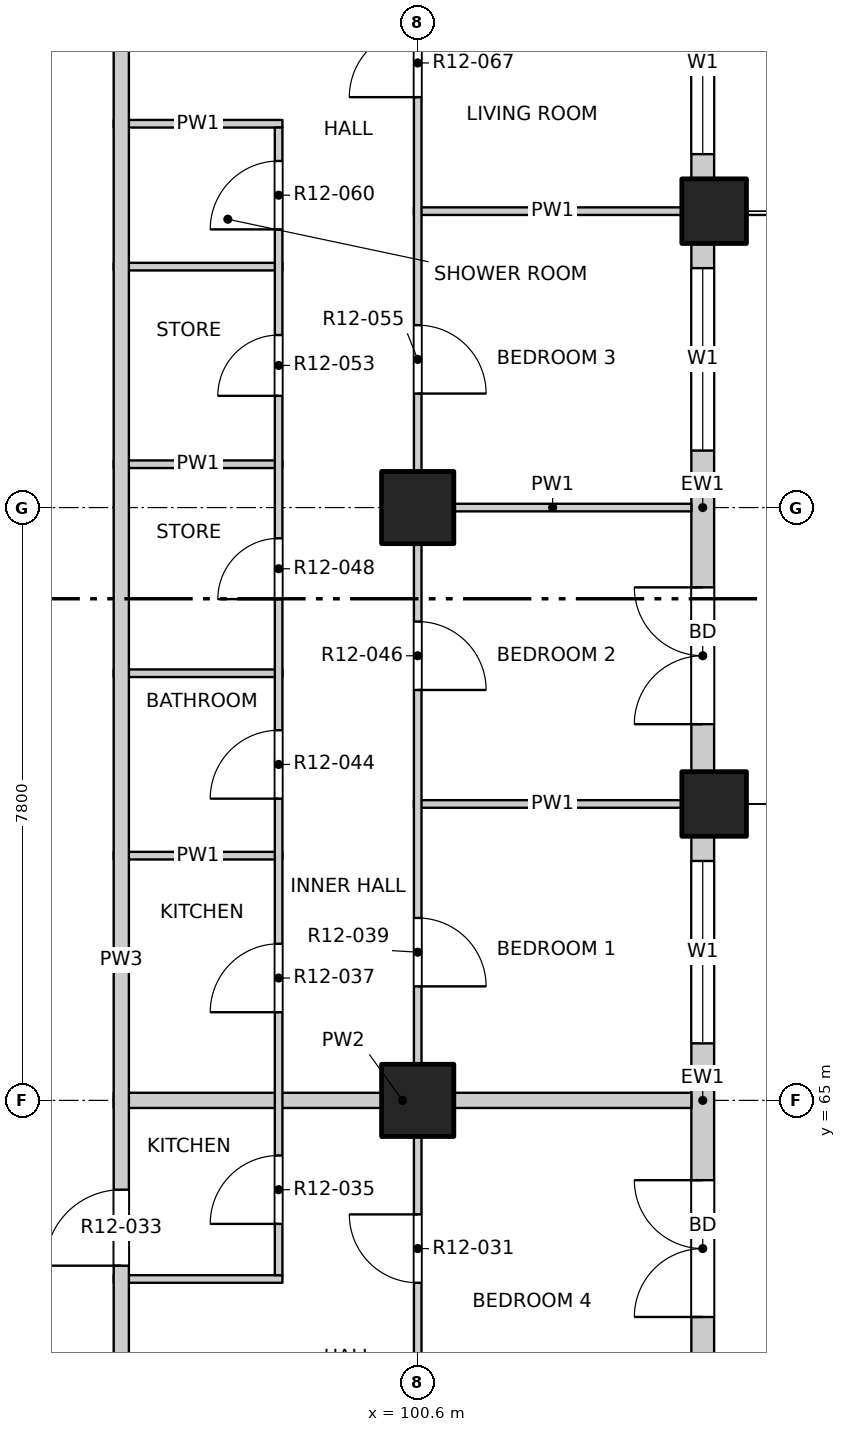
"""IFC4 building model, lengths in metres.
Left out: names, types, materials, properties, quantities, classifications, styles, units other than length and angle.
Written with IfcOpenShell. Run it as: python <this file> out.ifc"""

import sys

from ifc_helpers import new_model, si_unit, direction, frame, frame_2d, origin, origin_2d, place, context, subcontext, project, spatial, rectangle, extrude, element, fill, save


model = new_model("IFC4")
c1 = context("Model", 3, precision=1e-05, world=origin(), true_north=direction((0.0, 1.0)))
c2 = subcontext(c1, "Body", "Model", "MODEL_VIEW")
j1 = project(units=[si_unit("LENGTHUNIT", "METRE"), si_unit("PLANEANGLEUNIT", "RADIAN")], contexts=[c1])
p1 = place(None, origin())
s1 = spatial("IfcSite", under=j1, at=p1, CompositionType="ELEMENT")
p2 = place(p1, origin())
s2 = spatial("IfcBuilding", under=s1, at=p2, CompositionType="ELEMENT")
p3 = place(p2, frame((0.0, 0.0, 137.3)))
s3 = spatial("IfcBuildingStorey", under=s2, at=p3, CompositionType="ELEMENT", Elevation=137.3)
for number, where, z_axis, x_axis in (
    (1, (104.5, 68.9, -0.25), (0.0, 0.0, 1.0), (1.0, 0.0, 0.0)),
    (2, (104.5, 76.7, -0.25), (0.0, 0.0, 1.0), (1.0, 0.0, 0.0)),
):
    element("IfcColumn", number, at=place(p3, frame(where, z_axis=z_axis, x_axis=x_axis)), inside=s3, PredefinedType="COLUMN", context=c2, shape_type="SweptSolid", body=[
        extrude(rectangle(XDim=0.85, YDim=0.85, at=origin_2d()), origin(), (0.0, 0.0, 1.0), 3.4),
    ])
for number, where, z_axis, x_axis in (
    (3, (100.6, 65.0, -0.25), (0.0, 0.0, 1.0), (1.0, 0.0, 0.0)),
    (4, (100.6, 72.8, -0.25), (0.0, 0.0, 1.0), (1.0, 0.0, 0.0)),
):
    element("IfcColumn", number, at=place(p3, frame(where, z_axis=z_axis, x_axis=x_axis)), inside=s3, PredefinedType="COLUMN", context=c2, shape_type="SweptSolid", body=[
        extrude(rectangle(XDim=0.95, YDim=0.95, at=origin_2d()), origin(), (0.0, 0.0, 1.0), 3.4),
    ])
p4 = place(p3, frame((104.35, 61.525, 0.0), z_axis=(0.0, 0.0, 1.0), x_axis=(0.0, 1.0, 0.0)))
e5 = element("IfcWall", 5, at=p4, inside=s3, PredefinedType="SOLIDWALL", context=c2, shape_type="SweptSolid", body=[
    extrude(rectangle(XDim=6.95, YDim=0.3, at=frame_2d((3.475, 0.0))), origin(), (0.0, 0.0, 1.0), 2.7),
])
p5 = place(p4, frame((0.625, 0.0, 0.0)))
e6 = element("IfcOpeningElement", 6, at=p5, cuts=e5, PredefinedType="OPENING", context=c2, shape_type="SweptSolid", body=[
    extrude(rectangle(XDim=1.8, YDim=2.4, at=frame_2d((0.9, 1.2))), frame((0.0, 0.16, 0.0), z_axis=(0.0, -1.0, 0.0), x_axis=(1.0, 0.0, 0.0)), (0.0, 0.0, 1.0), 0.32),
])
p6 = place(p4, frame((4.225, 0.0, 0.9)))
e7 = element("IfcOpeningElement", 7, at=p6, cuts=e5, PredefinedType="OPENING", context=c2, shape_type="SweptSolid", body=[
    extrude(rectangle(XDim=2.4, YDim=1.8, at=frame_2d((1.2, 0.9))), frame((0.0, 0.16, 0.0), z_axis=(0.0, -1.0, 0.0), x_axis=(1.0, 0.0, 0.0)), (0.0, 0.0, 1.0), 0.32),
])
p7 = place(p3, frame((104.35, 69.325, 0.0), z_axis=(0.0, 0.0, 1.0), x_axis=(0.0, 1.0, 0.0)))
e8 = element("IfcWall", 8, at=p7, inside=s3, PredefinedType="SOLIDWALL", context=c2, shape_type="SweptSolid", body=[
    extrude(rectangle(XDim=6.95, YDim=0.3, at=frame_2d((3.475, 0.0))), origin(), (0.0, 0.0, 1.0), 2.7),
])
p8 = place(p7, frame((0.625, 0.0, 0.0)))
e9 = element("IfcOpeningElement", 9, at=p8, cuts=e8, PredefinedType="OPENING", context=c2, shape_type="SweptSolid", body=[
    extrude(rectangle(XDim=1.8, YDim=2.4, at=frame_2d((0.9, 1.2))), frame((0.0, 0.16, 0.0), z_axis=(0.0, -1.0, 0.0), x_axis=(1.0, 0.0, 0.0)), (0.0, 0.0, 1.0), 0.32),
])
p9 = place(p7, frame((4.225, 0.0, 0.9)))
e10 = element("IfcOpeningElement", 10, at=p9, cuts=e8, PredefinedType="OPENING", context=c2, shape_type="SweptSolid", body=[
    extrude(rectangle(XDim=2.4, YDim=1.8, at=frame_2d((1.2, 0.9))), frame((0.0, 0.16, 0.0), z_axis=(0.0, -1.0, 0.0), x_axis=(1.0, 0.0, 0.0)), (0.0, 0.0, 1.0), 0.32),
])
p10 = place(p3, frame((104.35, 77.125, 0.0), z_axis=(0.0, 0.0, 1.0), x_axis=(0.0, 1.0, 0.0)))
e11 = element("IfcWall", 11, at=p10, inside=s3, PredefinedType="SOLIDWALL", context=c2, shape_type="SweptSolid", body=[
    extrude(rectangle(XDim=3.475, YDim=0.3, at=frame_2d((1.738, 0.0))), origin(), (0.0, 0.0, 1.0), 2.7),
])
p11 = place(p10, frame((0.325, 0.0, 0.9)))
e12 = element("IfcOpeningElement", 12, at=p11, cuts=e11, PredefinedType="OPENING", context=c2, shape_type="SweptSolid", body=[
    extrude(rectangle(XDim=2.4, YDim=1.8, at=frame_2d((1.2, 0.9))), frame((0.0, 0.16, 0.0), z_axis=(0.0, -1.0, 0.0), x_axis=(1.0, 0.0, 0.0)), (0.0, 0.0, 1.0), 0.32),
])
p12 = place(p3, frame((96.6, 62.65, 0.0), z_axis=(0.0, 0.0, 1.0), x_axis=(1.0, 0.0, 0.0)))
e13 = element("IfcWall", 13, at=p12, inside=s3, PredefinedType="PARTITIONING", context=c2, shape_type="SweptSolid", body=[
    extrude(rectangle(XDim=2.22, YDim=0.1, at=frame_2d((1.11, 0.0))), origin(), (0.0, 0.0, 1.0), 3.15),
])
p13 = place(p3, frame((96.6, 65.0, 0.0), z_axis=(0.0, 0.0, 1.0), x_axis=(1.0, 0.0, 0.0)))
e14 = element("IfcWall", 14, at=p13, inside=s3, PredefinedType="PARTITIONING", context=c2, shape_type="SweptSolid", body=[
    extrude(rectangle(XDim=7.6, YDim=0.2, at=frame_2d((3.8, 0.0))), origin(), (0.0, 0.0, 1.0), 3.15),
])
p14 = place(p3, frame((96.6, 68.22, 0.0), z_axis=(0.0, 0.0, 1.0), x_axis=(1.0, 0.0, 0.0)))
e15 = element("IfcWall", 15, at=p14, inside=s3, PredefinedType="PARTITIONING", context=c2, shape_type="SweptSolid", body=[
    extrude(rectangle(XDim=2.22, YDim=0.1, at=frame_2d((1.11, 0.0))), origin(), (0.0, 0.0, 1.0), 3.15),
])
p15 = place(p3, frame((100.55, 68.9, 0.0), z_axis=(0.0, 0.0, 1.0), x_axis=(1.0, 0.0, 0.0)))
e16 = element("IfcWall", 16, at=p15, inside=s3, PredefinedType="PARTITIONING", context=c2, shape_type="SweptSolid", body=[
    extrude(rectangle(XDim=3.65, YDim=0.1, at=frame_2d((1.825, 0.0))), origin(), (0.0, 0.0, 1.0), 2.55),
])
p16 = place(p3, frame((96.6, 70.62, 0.0), z_axis=(0.0, 0.0, 1.0), x_axis=(1.0, 0.0, 0.0)))
e17 = element("IfcWall", 17, at=p16, inside=s3, PredefinedType="PARTITIONING", context=c2, shape_type="SweptSolid", body=[
    extrude(rectangle(XDim=2.22, YDim=0.1, at=frame_2d((1.11, 0.0))), origin(), (0.0, 0.0, 1.0), 3.15),
])
p17 = place(p3, frame((100.55, 72.8, 0.0), z_axis=(0.0, 0.0, 1.0), x_axis=(1.0, 0.0, 0.0)))
e18 = element("IfcWall", 18, at=p17, inside=s3, PredefinedType="PARTITIONING", context=c2, shape_type="SweptSolid", body=[
    extrude(rectangle(XDim=3.65, YDim=0.1, at=frame_2d((1.825, 0.0))), origin(), (0.0, 0.0, 1.0), 3.15),
])
for number, where, z_axis, x_axis in (
    (19, (96.6, 73.37, 0.0), (0.0, 0.0, 1.0), (1.0, 0.0, 0.0)),
    (20, (96.6, 75.97, 0.0), (0.0, 0.0, 1.0), (1.0, 0.0, 0.0)),
):
    element("IfcWall", number, at=place(p3, frame(where, z_axis=z_axis, x_axis=x_axis)), inside=s3, PredefinedType="PARTITIONING", context=c2, shape_type="SweptSolid", body=[
        extrude(rectangle(XDim=2.22, YDim=0.1, at=frame_2d((1.11, 0.0))), origin(), (0.0, 0.0, 1.0), 3.15),
    ])
p18 = place(p3, frame((100.55, 76.7, 0.0), z_axis=(0.0, 0.0, 1.0), x_axis=(1.0, 0.0, 0.0)))
e21 = element("IfcWall", 21, at=p18, inside=s3, PredefinedType="PARTITIONING", context=c2, shape_type="SweptSolid", body=[
    extrude(rectangle(XDim=3.65, YDim=0.1, at=frame_2d((1.825, 0.0))), origin(), (0.0, 0.0, 1.0), 2.55),
])
p19 = place(p3, frame((96.6, 77.85, 0.0), z_axis=(0.0, 0.0, 1.0), x_axis=(1.0, 0.0, 0.0)))
e22 = element("IfcWall", 22, at=p19, inside=s3, PredefinedType="PARTITIONING", context=c2, shape_type="SweptSolid", body=[
    extrude(rectangle(XDim=2.22, YDim=0.1, at=frame_2d((1.11, 0.0))), origin(), (0.0, 0.0, 1.0), 3.15),
])
p20 = place(p3, frame((96.7, 49.5, 0.0), z_axis=(0.0, 0.0, 1.0), x_axis=(0.0, 1.0, 0.0)))
e23 = element("IfcWall", 23, at=p20, inside=s3, PredefinedType="PARTITIONING", context=c2, shape_type="SweptSolid", body=[
    extrude(rectangle(XDim=34.7, YDim=0.2, at=frame_2d((17.35, 0.0))), origin(), (0.0, 0.0, 1.0), 3.15),
])
p21 = place(p20, frame((13.325, 0.0, 0.0)))
e24 = element("IfcOpeningElement", 24, at=p21, cuts=e23, PredefinedType="OPENING", context=c2, shape_type="SweptSolid", body=[
    extrude(rectangle(XDim=1.0, YDim=2.1, at=frame_2d((0.5, 1.05))), frame((0.0, 0.11, 0.0), z_axis=(0.0, -1.0, 0.0), x_axis=(1.0, 0.0, 0.0)), (0.0, 0.0, 1.0), 0.22),
])
p22 = place(p20, frame((29.625, 0.0, 0.0)))
e25 = element("IfcOpeningElement", 25, at=p22, cuts=e23, PredefinedType="OPENING", context=c2, shape_type="SweptSolid", body=[
    extrude(rectangle(XDim=1.0, YDim=2.1, at=frame_2d((0.5, 1.05))), frame((0.0, 0.11, 0.0), z_axis=(0.0, -1.0, 0.0), x_axis=(1.0, 0.0, 0.0)), (0.0, 0.0, 1.0), 0.22),
])
p23 = place(p3, frame((98.77, 62.7, 0.0), z_axis=(0.0, 0.0, 1.0), x_axis=(0.0, 1.0, 0.0)))
e26 = element("IfcWall", 26, at=p23, inside=s3, PredefinedType="PARTITIONING", context=c2, shape_type="SweptSolid", body=[
    extrude(rectangle(XDim=15.1, YDim=0.1, at=frame_2d((7.55, 0.0))), origin(), (0.0, 0.0, 1.0), 3.15),
])
p24 = place(p23, frame((0.675, 0.0, 0.0)))
e27 = element("IfcOpeningElement", 27, at=p24, cuts=e26, PredefinedType="OPENING", context=c2, shape_type="SweptSolid", body=[
    extrude(rectangle(XDim=0.9, YDim=2.1, at=frame_2d((0.45, 1.05))), frame((0.0, 0.06, 0.0), z_axis=(0.0, -1.0, 0.0), x_axis=(1.0, 0.0, 0.0)), (0.0, 0.0, 1.0), 0.12),
])
p25 = place(p23, frame((3.46, 0.0, 0.0)))
e28 = element("IfcOpeningElement", 28, at=p25, cuts=e26, PredefinedType="OPENING", context=c2, shape_type="SweptSolid", body=[
    extrude(rectangle(XDim=0.9, YDim=2.1, at=frame_2d((0.45, 1.05))), frame((0.0, 0.06, 0.0), z_axis=(0.0, -1.0, 0.0), x_axis=(1.0, 0.0, 0.0)), (0.0, 0.0, 1.0), 0.12),
])
p26 = place(p23, frame((6.27, 0.0, 0.0)))
e29 = element("IfcOpeningElement", 29, at=p26, cuts=e26, PredefinedType="OPENING", context=c2, shape_type="SweptSolid", body=[
    extrude(rectangle(XDim=0.9, YDim=2.1, at=frame_2d((0.45, 1.05))), frame((0.0, 0.06, 0.0), z_axis=(0.0, -1.0, 0.0), x_axis=(1.0, 0.0, 0.0)), (0.0, 0.0, 1.0), 0.12),
])
p27 = place(p23, frame((8.895, 0.0, 0.0)))
e30 = element("IfcOpeningElement", 30, at=p27, cuts=e26, PredefinedType="OPENING", context=c2, shape_type="SweptSolid", body=[
    extrude(rectangle(XDim=0.8, YDim=2.1, at=frame_2d((0.4, 1.05))), frame((0.0, 0.06, 0.0), z_axis=(0.0, -1.0, 0.0), x_axis=(1.0, 0.0, 0.0)), (0.0, 0.0, 1.0), 0.12),
])
p28 = place(p23, frame((11.57, 0.0, 0.0)))
e31 = element("IfcOpeningElement", 31, at=p28, cuts=e26, PredefinedType="OPENING", context=c2, shape_type="SweptSolid", body=[
    extrude(rectangle(XDim=0.8, YDim=2.1, at=frame_2d((0.4, 1.05))), frame((0.0, 0.06, 0.0), z_axis=(0.0, -1.0, 0.0), x_axis=(1.0, 0.0, 0.0)), (0.0, 0.0, 1.0), 0.12),
])
p29 = place(p23, frame((13.76, 0.0, 0.0)))
e32 = element("IfcOpeningElement", 32, at=p29, cuts=e26, PredefinedType="OPENING", context=c2, shape_type="SweptSolid", body=[
    extrude(rectangle(XDim=0.9, YDim=2.1, at=frame_2d((0.45, 1.05))), frame((0.0, 0.06, 0.0), z_axis=(0.0, -1.0, 0.0), x_axis=(1.0, 0.0, 0.0)), (0.0, 0.0, 1.0), 0.12),
])
p30 = place(p3, frame((100.6, 45.8, 0.0), z_axis=(0.0, 0.0, 1.0), x_axis=(0.0, 1.0, 0.0)))
e33 = element("IfcWall", 33, at=p30, inside=s3, PredefinedType="PARTITIONING", context=c2, shape_type="SweptSolid", body=[
    extrude(rectangle(XDim=38.4, YDim=0.1, at=frame_2d((19.2, 0.0))), origin(), (0.0, 0.0, 1.0), 3.15),
])
p31 = place(p30, frame((1.05, 0.0, 0.0)))
e34 = element("IfcOpeningElement", 34, at=p31, cuts=e33, PredefinedType="OPENING", context=c2, shape_type="SweptSolid", body=[
    extrude(rectangle(XDim=1.2, YDim=2.1, at=frame_2d((0.6, 1.05))), frame((0.0, 0.06, 0.0), z_axis=(0.0, -1.0, 0.0), x_axis=(1.0, 0.0, 0.0)), (0.0, 0.0, 1.0), 0.12),
])
p32 = place(p30, frame((5.1, 0.0, 0.0)))
e35 = element("IfcOpeningElement", 35, at=p32, cuts=e33, PredefinedType="OPENING", context=c2, shape_type="SweptSolid", body=[
    extrude(rectangle(XDim=0.9, YDim=2.1, at=frame_2d((0.45, 1.05))), frame((0.0, 0.06, 0.0), z_axis=(0.0, -1.0, 0.0), x_axis=(1.0, 0.0, 0.0)), (0.0, 0.0, 1.0), 0.12),
])
p33 = place(p30, frame((9.0, 0.0, 0.0)))
e36 = element("IfcOpeningElement", 36, at=p33, cuts=e33, PredefinedType="OPENING", context=c2, shape_type="SweptSolid", body=[
    extrude(rectangle(XDim=0.9, YDim=2.1, at=frame_2d((0.45, 1.05))), frame((0.0, 0.06, 0.0), z_axis=(0.0, -1.0, 0.0), x_axis=(1.0, 0.0, 0.0)), (0.0, 0.0, 1.0), 0.12),
])
p34 = place(p30, frame((12.9, 0.0, 0.0)))
e37 = element("IfcOpeningElement", 37, at=p34, cuts=e33, PredefinedType="OPENING", context=c2, shape_type="SweptSolid", body=[
    extrude(rectangle(XDim=0.9, YDim=2.1, at=frame_2d((0.45, 1.05))), frame((0.0, 0.06, 0.0), z_axis=(0.0, -1.0, 0.0), x_axis=(1.0, 0.0, 0.0)), (0.0, 0.0, 1.0), 0.12),
])
p35 = place(p30, frame((16.8, 0.0, 0.0)))
e38 = element("IfcOpeningElement", 38, at=p35, cuts=e33, PredefinedType="OPENING", context=c2, shape_type="SweptSolid", body=[
    extrude(rectangle(XDim=0.9, YDim=2.1, at=frame_2d((0.45, 1.05))), frame((0.0, 0.06, 0.0), z_axis=(0.0, -1.0, 0.0), x_axis=(1.0, 0.0, 0.0)), (0.0, 0.0, 1.0), 0.12),
])
p36 = place(p30, frame((20.7, 0.0, 0.0)))
e39 = element("IfcOpeningElement", 39, at=p36, cuts=e33, PredefinedType="OPENING", context=c2, shape_type="SweptSolid", body=[
    extrude(rectangle(XDim=0.9, YDim=2.1, at=frame_2d((0.45, 1.05))), frame((0.0, 0.06, 0.0), z_axis=(0.0, -1.0, 0.0), x_axis=(1.0, 0.0, 0.0)), (0.0, 0.0, 1.0), 0.12),
])
p37 = place(p30, frame((24.6, 0.0, 0.0)))
e40 = element("IfcOpeningElement", 40, at=p37, cuts=e33, PredefinedType="OPENING", context=c2, shape_type="SweptSolid", body=[
    extrude(rectangle(XDim=0.9, YDim=2.1, at=frame_2d((0.45, 1.05))), frame((0.0, 0.06, 0.0), z_axis=(0.0, -1.0, 0.0), x_axis=(1.0, 0.0, 0.0)), (0.0, 0.0, 1.0), 0.12),
])
p38 = place(p30, frame((28.5, 0.0, 0.0)))
e41 = element("IfcOpeningElement", 41, at=p38, cuts=e33, PredefinedType="OPENING", context=c2, shape_type="SweptSolid", body=[
    extrude(rectangle(XDim=0.9, YDim=2.1, at=frame_2d((0.45, 1.05))), frame((0.0, 0.06, 0.0), z_axis=(0.0, -1.0, 0.0), x_axis=(1.0, 0.0, 0.0)), (0.0, 0.0, 1.0), 0.12),
])
p39 = place(p30, frame((32.4, 0.0, 0.0)))
e42 = element("IfcOpeningElement", 42, at=p39, cuts=e33, PredefinedType="OPENING", context=c2, shape_type="SweptSolid", body=[
    extrude(rectangle(XDim=0.9, YDim=2.1, at=frame_2d((0.45, 1.05))), frame((0.0, 0.06, 0.0), z_axis=(0.0, -1.0, 0.0), x_axis=(1.0, 0.0, 0.0)), (0.0, 0.0, 1.0), 0.12),
])
p40 = place(p30, frame((36.15, 0.0, 0.0)))
e43 = element("IfcOpeningElement", 43, at=p40, cuts=e33, PredefinedType="OPENING", context=c2, shape_type="SweptSolid", body=[
    extrude(rectangle(XDim=1.2, YDim=2.1, at=frame_2d((0.6, 1.05))), frame((0.0, 0.06, 0.0), z_axis=(0.0, -1.0, 0.0), x_axis=(1.0, 0.0, 0.0)), (0.0, 0.0, 1.0), 0.12),
])
p41 = place(p5, origin())
e44 = element("IfcDoor", 44, at=p41, inside=s3, OperationType="DOUBLE_DOOR_SINGLE_SWING", PredefinedType="DOOR", context=c2, shape_type="SweptSolid", body=[
    extrude(rectangle(XDim=1.8, YDim=2.4, at=frame_2d((0.9, 1.2))), frame((0.0, 0.025, 0.0), z_axis=(0.0, -1.0, 0.0), x_axis=(1.0, 0.0, 0.0)), (0.0, 0.0, 1.0), 0.05),
])
fill(e6, e44)
p42 = place(p6, origin())
e45 = element("IfcWindow", 45, at=p42, inside=s3, PartitioningType="DOUBLE_PANEL_VERTICAL", PredefinedType="WINDOW", context=c2, shape_type="SweptSolid", body=[
    extrude(rectangle(XDim=2.4, YDim=1.8, at=frame_2d((1.2, 0.9))), frame((0.0, 0.03, 0.0), z_axis=(0.0, -1.0, 0.0), x_axis=(1.0, 0.0, 0.0)), (0.0, 0.0, 1.0), 0.06),
])
fill(e7, e45)
p43 = place(p8, origin())
e46 = element("IfcDoor", 46, at=p43, inside=s3, OperationType="DOUBLE_DOOR_SINGLE_SWING", PredefinedType="DOOR", context=c2, shape_type="SweptSolid", body=[
    extrude(rectangle(XDim=1.8, YDim=2.4, at=frame_2d((0.9, 1.2))), frame((0.0, 0.025, 0.0), z_axis=(0.0, -1.0, 0.0), x_axis=(1.0, 0.0, 0.0)), (0.0, 0.0, 1.0), 0.05),
])
fill(e9, e46)
p44 = place(p9, origin())
e47 = element("IfcWindow", 47, at=p44, inside=s3, PartitioningType="DOUBLE_PANEL_VERTICAL", PredefinedType="WINDOW", context=c2, shape_type="SweptSolid", body=[
    extrude(rectangle(XDim=2.4, YDim=1.8, at=frame_2d((1.2, 0.9))), frame((0.0, 0.03, 0.0), z_axis=(0.0, -1.0, 0.0), x_axis=(1.0, 0.0, 0.0)), (0.0, 0.0, 1.0), 0.06),
])
fill(e10, e47)
p45 = place(p11, origin())
e48 = element("IfcWindow", 48, at=p45, inside=s3, PartitioningType="DOUBLE_PANEL_VERTICAL", PredefinedType="WINDOW", context=c2, shape_type="SweptSolid", body=[
    extrude(rectangle(XDim=2.4, YDim=1.8, at=frame_2d((1.2, 0.9))), frame((0.0, 0.03, 0.0), z_axis=(0.0, -1.0, 0.0), x_axis=(1.0, 0.0, 0.0)), (0.0, 0.0, 1.0), 0.06),
])
fill(e12, e48)
p46 = place(p35, origin())
e49 = element("IfcDoor", 49, at=p46, inside=s3, OperationType="SINGLE_SWING_RIGHT", PredefinedType="DOOR", context=c2, shape_type="SweptSolid", body=[
    extrude(rectangle(XDim=0.9, YDim=2.1, at=frame_2d((0.45, 1.05))), frame((0.0, 0.025, 0.0), z_axis=(0.0, -1.0, 0.0), x_axis=(1.0, 0.0, 0.0)), (0.0, 0.0, 1.0), 0.05),
])
fill(e38, e49)
p47 = place(p21, origin())
e50 = element("IfcDoor", 50, at=p47, inside=s3, OperationType="SINGLE_SWING_LEFT", PredefinedType="DOOR", context=c2, shape_type="SweptSolid", body=[
    extrude(rectangle(XDim=1.0, YDim=2.1, at=frame_2d((0.5, 1.05))), frame((0.0, 0.025, 0.0), z_axis=(0.0, -1.0, 0.0), x_axis=(1.0, 0.0, 0.0)), (0.0, 0.0, 1.0), 0.05),
])
fill(e24, e50)
p48 = place(p24, origin())
e51 = element("IfcDoor", 51, at=p48, inside=s3, OperationType="SINGLE_SWING_LEFT", PredefinedType="DOOR", context=c2, shape_type="SweptSolid", body=[
    extrude(rectangle(XDim=0.9, YDim=2.1, at=frame_2d((0.45, 1.05))), frame((0.0, 0.025, 0.0), z_axis=(0.0, -1.0, 0.0), x_axis=(1.0, 0.0, 0.0)), (0.0, 0.0, 1.0), 0.05),
])
fill(e27, e51)
p49 = place(p25, origin())
e52 = element("IfcDoor", 52, at=p49, inside=s3, OperationType="SINGLE_SWING_LEFT", PredefinedType="DOOR", context=c2, shape_type="SweptSolid", body=[
    extrude(rectangle(XDim=0.9, YDim=2.1, at=frame_2d((0.45, 1.05))), frame((0.0, 0.025, 0.0), z_axis=(0.0, -1.0, 0.0), x_axis=(1.0, 0.0, 0.0)), (0.0, 0.0, 1.0), 0.05),
])
fill(e28, e52)
p50 = place(p36, origin())
e53 = element("IfcDoor", 53, at=p50, inside=s3, OperationType="SINGLE_SWING_RIGHT", PredefinedType="DOOR", context=c2, shape_type="SweptSolid", body=[
    extrude(rectangle(XDim=0.9, YDim=2.1, at=frame_2d((0.45, 1.05))), frame((0.0, 0.025, 0.0), z_axis=(0.0, -1.0, 0.0), x_axis=(1.0, 0.0, 0.0)), (0.0, 0.0, 1.0), 0.05),
])
fill(e39, e53)
p51 = place(p26, origin())
e54 = element("IfcDoor", 54, at=p51, inside=s3, OperationType="SINGLE_SWING_LEFT", PredefinedType="DOOR", context=c2, shape_type="SweptSolid", body=[
    extrude(rectangle(XDim=0.9, YDim=2.1, at=frame_2d((0.45, 1.05))), frame((0.0, 0.025, 0.0), z_axis=(0.0, -1.0, 0.0), x_axis=(1.0, 0.0, 0.0)), (0.0, 0.0, 1.0), 0.05),
])
fill(e29, e54)
p52 = place(p37, origin())
e55 = element("IfcDoor", 55, at=p52, inside=s3, OperationType="SINGLE_SWING_RIGHT", PredefinedType="DOOR", context=c2, shape_type="SweptSolid", body=[
    extrude(rectangle(XDim=0.9, YDim=2.1, at=frame_2d((0.45, 1.05))), frame((0.0, 0.025, 0.0), z_axis=(0.0, -1.0, 0.0), x_axis=(1.0, 0.0, 0.0)), (0.0, 0.0, 1.0), 0.05),
])
fill(e40, e55)
p53 = place(p27, origin())
e56 = element("IfcDoor", 56, at=p53, inside=s3, OperationType="SINGLE_SWING_LEFT", PredefinedType="DOOR", context=c2, shape_type="SweptSolid", body=[
    extrude(rectangle(XDim=0.8, YDim=2.1, at=frame_2d((0.4, 1.05))), frame((0.0, 0.025, 0.0), z_axis=(0.0, -1.0, 0.0), x_axis=(1.0, 0.0, 0.0)), (0.0, 0.0, 1.0), 0.05),
])
fill(e30, e56)
p54 = place(p28, origin())
e57 = element("IfcDoor", 57, at=p54, inside=s3, OperationType="SINGLE_SWING_LEFT", PredefinedType="DOOR", context=c2, shape_type="SweptSolid", body=[
    extrude(rectangle(XDim=0.8, YDim=2.1, at=frame_2d((0.4, 1.05))), frame((0.0, 0.025, 0.0), z_axis=(0.0, -1.0, 0.0), x_axis=(1.0, 0.0, 0.0)), (0.0, 0.0, 1.0), 0.05),
])
fill(e31, e57)
p55 = place(p38, origin())
e58 = element("IfcDoor", 58, at=p55, inside=s3, OperationType="SINGLE_SWING_RIGHT", PredefinedType="DOOR", context=c2, shape_type="SweptSolid", body=[
    extrude(rectangle(XDim=0.9, YDim=2.1, at=frame_2d((0.45, 1.05))), frame((0.0, 0.025, 0.0), z_axis=(0.0, -1.0, 0.0), x_axis=(1.0, 0.0, 0.0)), (0.0, 0.0, 1.0), 0.05),
])
fill(e41, e58)
p56 = place(p29, origin())
e59 = element("IfcDoor", 59, at=p56, inside=s3, OperationType="SINGLE_SWING_LEFT", PredefinedType="DOOR", context=c2, shape_type="SweptSolid", body=[
    extrude(rectangle(XDim=0.9, YDim=2.1, at=frame_2d((0.45, 1.05))), frame((0.0, 0.025, 0.0), z_axis=(0.0, -1.0, 0.0), x_axis=(1.0, 0.0, 0.0)), (0.0, 0.0, 1.0), 0.05),
])
fill(e32, e59)
p57 = place(p39, origin())
e60 = element("IfcDoor", 60, at=p57, inside=s3, OperationType="SINGLE_SWING_LEFT", PredefinedType="DOOR", context=c2, shape_type="SweptSolid", body=[
    extrude(rectangle(XDim=0.9, YDim=2.1, at=frame_2d((0.45, 1.05))), frame((0.0, 0.025, 0.0), z_axis=(0.0, -1.0, 0.0), x_axis=(1.0, 0.0, 0.0)), (0.0, 0.0, 1.0), 0.05),
])
fill(e42, e60)
save(model, sys.argv[1])
